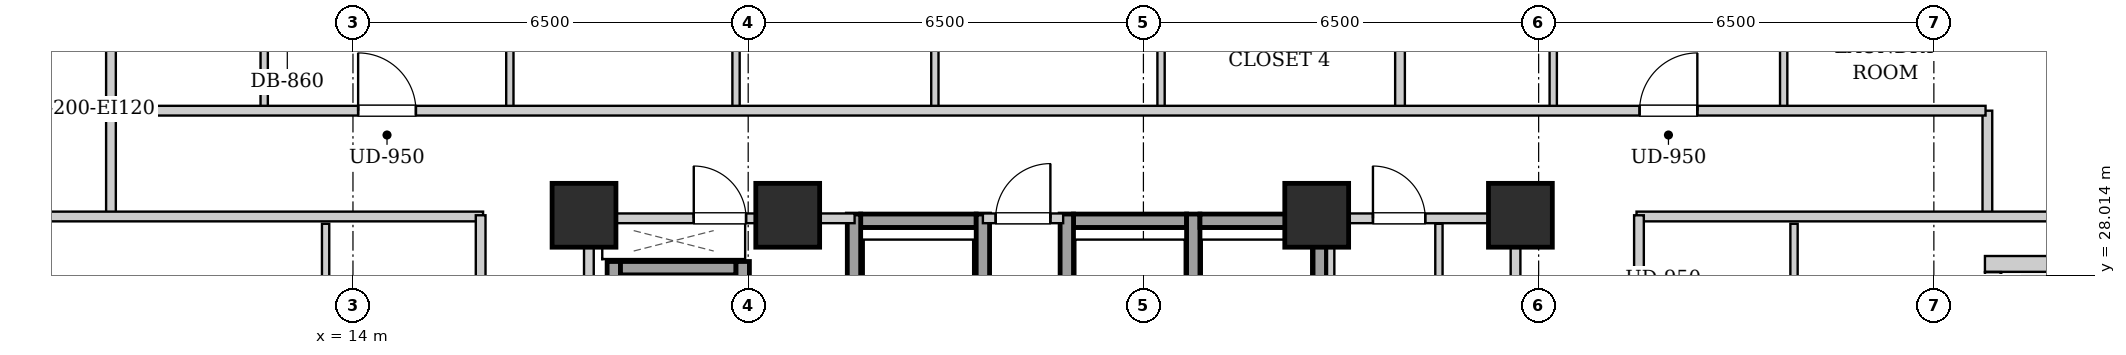
"""IFC4 building model, lengths in metres.
Left out: names, types, materials, properties, quantities, classifications, styles, units other than length and angle.
Written with IfcOpenShell. Run it as: python <this file> out.ifc"""

import sys

from ifc_helpers import new_model, si_unit, direction, frame, frame_2d, origin, origin_2d, place, context, subcontext, project, spatial, rectangle, extrude, element, fill, save


model = new_model("IFC4")
c1 = context("Model", 3, precision=1e-05, world=origin(), true_north=direction((0.0, 1.0)))
c2 = subcontext(c1, "Body", "Model", "MODEL_VIEW")
j1 = project(units=[si_unit("LENGTHUNIT", "METRE"), si_unit("PLANEANGLEUNIT", "RADIAN")], contexts=[c1])
p1 = place(None, origin())
s1 = spatial("IfcSite", under=j1, at=p1, CompositionType="ELEMENT")
p2 = place(p1, origin())
s2 = spatial("IfcBuilding", under=s1, at=p2, CompositionType="ELEMENT")
p3 = place(p2, frame((0.0, 0.0, 110.3)))
s3 = spatial("IfcBuildingStorey", under=s2, at=p3, CompositionType="ELEMENT", Elevation=110.3)
for number, where, z_axis, x_axis in (
    (1, (17.8, 29.0, 0.0), (0.0, 0.0, 1.0), (1.0, 0.0, 0.0)),
    (2, (21.15, 29.0, 0.0), (0.0, 0.0, 1.0), (1.0, 0.0, 0.0)),
    (3, (29.85, 29.0, 0.0), (0.0, 0.0, 1.0), (1.0, 0.0, 0.0)),
    (4, (33.2, 29.0, 0.0), (0.0, 0.0, 1.0), (1.0, 0.0, 0.0)),
):
    element("IfcColumn", number, at=place(p3, frame(where, z_axis=z_axis, x_axis=x_axis)), inside=s3, PredefinedType="COLUMN", context=c2, shape_type="SweptSolid", body=[
        extrude(rectangle(XDim=1.05, YDim=1.05, at=origin_2d()), origin(), (0.0, 0.0, 1.0), 3.2),
    ])
p4 = place(p3, frame((43.24, 28.2, 0.0), z_axis=(0.0, 0.0, 1.0), x_axis=(-1.0, 0.0, 0.0)))
e5 = element("IfcWall", 5, at=p4, inside=s3, PredefinedType="SOLIDWALL", context=c2, shape_type="SweptSolid", body=[
    extrude(rectangle(XDim=2.4, YDim=0.26, at=frame_2d((1.2, 0.0))), origin(), (0.0, 0.0, 1.0), 2.94),
])
p5 = place(p3, frame((40.97, 28.066, 0.0), z_axis=(0.0, 0.0, 1.0), x_axis=(0.0, -1.0, 0.0)))
e6 = element("IfcWall", 6, at=p5, inside=s3, PredefinedType="SOLIDWALL", context=c2, shape_type="SweptSolid", body=[
    extrude(rectangle(XDim=3.332, YDim=0.26, at=frame_2d((1.666, 0.0))), origin(), (0.0, 0.0, 1.0), 2.94),
])
p6 = place(p5, frame((1.116, 0.0, 0.0)))
e7 = element("IfcOpeningElement", 7, at=p6, cuts=e6, PredefinedType="OPENING", context=c2, shape_type="SweptSolid", body=[
    extrude(rectangle(XDim=1.1, YDim=2.0, at=frame_2d((0.55, 1.0))), frame((0.0, 0.14, 0.0), z_axis=(0.0, -1.0, 0.0), x_axis=(1.0, 0.0, 0.0)), (0.0, 0.0, 1.0), 0.28),
])
p7 = place(p5, frame((0.276, 0.0, 0.55)))
e8 = element("IfcOpeningElement", 8, at=p7, cuts=e6, PredefinedType="OPENING", context=c2, shape_type="SweptSolid", body=[
    extrude(rectangle(XDim=0.68, YDim=1.2, at=frame_2d((0.34, 0.6))), frame((0.0, 0.14, 0.0), z_axis=(0.0, -1.0, 0.0), x_axis=(1.0, 0.0, 0.0)), (0.0, 0.0, 1.0), 0.28),
])
p8 = place(p3, frame((22.35, 28.91, 0.0), z_axis=(0.0, 0.0, 1.0), x_axis=(1.0, 0.0, 0.0)))
e9 = element("IfcWall", 9, at=p8, inside=s3, PredefinedType="SHEAR", context=c2, shape_type="SweptSolid", body=[
    extrude(rectangle(XDim=1.9, YDim=0.22, at=frame_2d((0.95, 0.0))), origin(), (0.0, 0.0, 1.0), 2.94),
])
for number, where, z_axis, x_axis in (
    (10, (22.24, 26.58, 0.0), (0.0, 0.0, 1.0), (0.0, 1.0, 0.0)),
    (11, (24.36, 26.58, 0.0), (0.0, 0.0, 1.0), (0.0, 1.0, 0.0)),
):
    element("IfcWall", number, at=place(p3, frame(where, z_axis=z_axis, x_axis=x_axis)), inside=s3, PredefinedType="SHEAR", context=c2, shape_type="SweptSolid", body=[
        extrude(rectangle(XDim=2.44, YDim=0.22, at=frame_2d((1.22, 0.0))), origin(), (0.0, 0.0, 1.0), 2.94),
    ])
p9 = place(p3, frame((25.85, 28.91, 0.0), z_axis=(0.0, 0.0, 1.0), x_axis=(1.0, 0.0, 0.0)))
e12 = element("IfcWall", 12, at=p9, inside=s3, PredefinedType="SHEAR", context=c2, shape_type="SweptSolid", body=[
    extrude(rectangle(XDim=1.86, YDim=0.22, at=frame_2d((0.93, 0.0))), origin(), (0.0, 0.0, 1.0), 2.94),
])
for number, where, z_axis, x_axis in (
    (13, (25.74, 26.58, 0.0), (0.0, 0.0, 1.0), (0.0, 1.0, 0.0)),
    (14, (27.82, 26.58, 0.0), (0.0, 0.0, 1.0), (0.0, 1.0, 0.0)),
):
    element("IfcWall", number, at=place(p3, frame(where, z_axis=z_axis, x_axis=x_axis)), inside=s3, PredefinedType="SHEAR", context=c2, shape_type="SweptSolid", body=[
        extrude(rectangle(XDim=2.44, YDim=0.22, at=frame_2d((1.22, 0.0))), origin(), (0.0, 0.0, 1.0), 2.94),
    ])
p10 = place(p3, frame((27.93, 28.91, 0.0), z_axis=(0.0, 0.0, 1.0), x_axis=(1.0, 0.0, 0.0)))
e15 = element("IfcWall", 15, at=p10, inside=s3, PredefinedType="SHEAR", context=c2, shape_type="SweptSolid", body=[
    extrude(rectangle(XDim=1.86, YDim=0.22, at=frame_2d((0.93, 0.0))), origin(), (0.0, 0.0, 1.0), 2.94),
])
p11 = place(p3, frame((29.9, 26.58, 0.0), z_axis=(0.0, 0.0, 1.0), x_axis=(0.0, 1.0, 0.0)))
e16 = element("IfcWall", 16, at=p11, inside=s3, PredefinedType="SHEAR", context=c2, shape_type="SweptSolid", body=[
    extrude(rectangle(XDim=2.44, YDim=0.22, at=frame_2d((1.22, 0.0))), origin(), (0.0, 0.0, 1.0), 2.94),
])
p12 = place(p3, frame((18.29, 24.1, 0.0), z_axis=(0.0, 0.0, 1.0), x_axis=(0.0, 1.0, 0.0)))
e17 = element("IfcWall", 17, at=p12, inside=s3, PredefinedType="SHEAR", context=c2, shape_type="SweptSolid", body=[
    extrude(rectangle(XDim=4.14, YDim=0.22, at=frame_2d((2.07, 0.0))), origin(), (0.0, 0.0, 1.0), 2.94),
])
p13 = place(p3, frame((18.4, 28.13, 0.0), z_axis=(0.0, 0.0, 1.0), x_axis=(1.0, 0.0, 0.0)))
e18 = element("IfcWall", 18, at=p13, inside=s3, PredefinedType="SHEAR", context=c2, shape_type="SweptSolid", body=[
    extrude(rectangle(XDim=1.9, YDim=0.22, at=frame_2d((0.95, 0.0))), origin(), (0.0, 0.0, 1.0), 2.94),
])
p14 = place(p3, frame((20.41, 26.06, 0.0), z_axis=(0.0, 0.0, 1.0), x_axis=(0.0, 1.0, 0.0)))
e19 = element("IfcWall", 19, at=p14, inside=s3, PredefinedType="SHEAR", context=c2, shape_type="SweptSolid", body=[
    extrude(rectangle(XDim=2.18, YDim=0.22, at=frame_2d((1.09, 0.0))), origin(), (0.0, 0.0, 1.0), 2.94),
])
for number, where, z_axis, x_axis in (
    (20, (17.88, 24.12, 0.0), (0.0, 0.0, 1.0), (0.0, 1.0, 0.0)),
    (21, (33.12, 24.12, 0.0), (0.0, 0.0, 1.0), (0.0, 1.0, 0.0)),
):
    element("IfcWall", number, at=place(p3, frame(where, z_axis=z_axis, x_axis=x_axis)), inside=s3, PredefinedType="PARTITIONING", context=c2, shape_type="SweptSolid", body=[
        extrude(rectangle(XDim=4.76, YDim=0.16, at=frame_2d((2.38, 0.0))), origin(), (0.0, 0.0, 1.0), 2.94),
    ])
p15 = place(p3, frame((24.36, 28.95, 0.0), z_axis=(0.0, 0.0, 1.0), x_axis=(1.0, 0.0, 0.0)))
e22 = element("IfcWall", 22, at=p15, inside=s3, PredefinedType="PARTITIONING", context=c2, shape_type="SweptSolid", body=[
    extrude(rectangle(XDim=1.32, YDim=0.16, at=frame_2d((0.66, 0.0))), origin(), (0.0, 0.0, 1.0), 2.313),
])
p16 = place(p15, frame((0.21, 0.0, 0.0)))
e23 = element("IfcOpeningElement", 23, at=p16, cuts=e22, PredefinedType="OPENING", context=c2, shape_type="SweptSolid", body=[
    extrude(rectangle(XDim=0.9, YDim=2.05, at=frame_2d((0.45, 1.025))), frame((0.0, 0.09, 0.0), z_axis=(0.0, -1.0, 0.0), x_axis=(1.0, 0.0, 0.0)), (0.0, 0.0, 1.0), 0.18),
])
p17 = place(p3, frame((17.96, 28.95, 0.0), z_axis=(0.0, 0.0, 1.0), x_axis=(1.0, 0.0, 0.0)))
e24 = element("IfcWall", 24, at=p17, inside=s3, PredefinedType="PARTITIONING", context=c2, shape_type="SweptSolid", body=[
    extrude(rectangle(XDim=4.29, YDim=0.16, at=frame_2d((2.145, 0.0))), origin(), (0.0, 0.0, 1.0), 2.313),
])
p18 = place(p17, frame((1.645, 0.0, 0.0)))
e25 = element("IfcOpeningElement", 25, at=p18, cuts=e24, PredefinedType="OPENING", context=c2, shape_type="SweptSolid", body=[
    extrude(rectangle(XDim=0.86, YDim=2.05, at=frame_2d((0.43, 1.025))), frame((0.0, 0.09, 0.0), z_axis=(0.0, -1.0, 0.0), x_axis=(1.0, 0.0, 0.0)), (0.0, 0.0, 1.0), 0.18),
])
p19 = place(p3, frame((30.08, 26.18, 0.0), z_axis=(0.0, 0.0, 1.0), x_axis=(0.0, 1.0, 0.0)))
e26 = element("IfcWall", 26, at=p19, inside=s3, PredefinedType="PARTITIONING", context=c2, shape_type="SweptSolid", body=[
    extrude(rectangle(XDim=2.68, YDim=0.12, at=frame_2d((1.34, 0.0))), origin(), (0.0, 0.0, 1.0), 2.94),
])
p20 = place(p3, frame((31.86, 26.2, 0.0), z_axis=(0.0, 0.0, 1.0), x_axis=(0.0, 1.0, 0.0)))
e27 = element("IfcWall", 27, at=p20, inside=s3, PredefinedType="PARTITIONING", context=c2, shape_type="SweptSolid", body=[
    extrude(rectangle(XDim=2.66, YDim=0.12, at=frame_2d((1.33, 0.0))), origin(), (0.0, 0.0, 1.0), 2.94),
])
p21 = place(p20, frame((0.92, 0.0, 0.0)))
e28 = element("IfcOpeningElement", 28, at=p21, cuts=e27, PredefinedType="OPENING", context=c2, shape_type="SweptSolid", body=[
    extrude(rectangle(XDim=0.86, YDim=2.05, at=frame_2d((0.43, 1.025))), frame((0.0, 0.07, 0.0), z_axis=(0.0, -1.0, 0.0), x_axis=(1.0, 0.0, 0.0)), (0.0, 0.0, 1.0), 0.14),
])
p22 = place(p3, frame((30.08, 28.95, 0.0), z_axis=(0.0, 0.0, 1.0), x_axis=(1.0, 0.0, 0.0)))
e29 = element("IfcWall", 29, at=p22, inside=s3, PredefinedType="PARTITIONING", context=c2, shape_type="SweptSolid", body=[
    extrude(rectangle(XDim=2.96, YDim=0.16, at=frame_2d((1.48, 0.0))), origin(), (0.0, 0.0, 1.0), 2.94),
])
p23 = place(p22, frame((0.695, 0.0, 0.0)))
e30 = element("IfcOpeningElement", 30, at=p23, cuts=e29, PredefinedType="OPENING", context=c2, shape_type="SweptSolid", body=[
    extrude(rectangle(XDim=0.86, YDim=2.05, at=frame_2d((0.43, 1.025))), frame((0.0, 0.09, 0.0), z_axis=(0.0, -1.0, 0.0), x_axis=(1.0, 0.0, 0.0)), (0.0, 0.0, 1.0), 0.18),
])
for number, where, z_axis, x_axis in (
    (31, (10.02, 28.98, 0.0), (0.0, 0.0, 1.0), (0.0, 1.0, 0.0)),
    (32, (40.88, 28.98, 0.0), (0.0, 0.0, 1.0), (0.0, 1.0, 0.0)),
):
    element("IfcWall", number, at=place(p3, frame(where, z_axis=z_axis, x_axis=x_axis)), inside=s3, PredefinedType="PARTITIONING", context=c2, shape_type="SweptSolid", body=[
        extrude(rectangle(XDim=1.74, YDim=0.16, at=frame_2d((0.87, 0.0))), origin(), (0.0, 0.0, 1.0), 2.94),
    ])
p24 = place(p3, frame((7.78, 28.98, 0.0), z_axis=(0.0, 0.0, 1.0), x_axis=(1.0, 0.0, 0.0)))
e33 = element("IfcWall", 33, at=p24, inside=s3, PredefinedType="PARTITIONING", context=c2, shape_type="SweptSolid", body=[
    extrude(rectangle(XDim=8.36, YDim=0.16, at=frame_2d((4.18, 0.0))), origin(), (0.0, 0.0, 1.0), 2.313),
])
p25 = place(p3, frame((35.11, 28.98, 0.0), z_axis=(0.0, 0.0, 1.0), x_axis=(1.0, 0.0, 0.0)))
e34 = element("IfcWall", 34, at=p25, inside=s3, PredefinedType="PARTITIONING", context=c2, shape_type="SweptSolid", body=[
    extrude(rectangle(XDim=8.01, YDim=0.16, at=frame_2d((4.005, 0.0))), origin(), (0.0, 0.0, 1.0), 2.313),
])
p26 = place(p3, frame((10.02, 30.76, 0.0), z_axis=(0.0, 0.0, 1.0), x_axis=(0.0, 1.0, 0.0)))
e35 = element("IfcWall", 35, at=p26, inside=s3, PredefinedType="PARTITIONING", context=c2, shape_type="SweptSolid", body=[
    extrude(rectangle(XDim=2.91, YDim=0.16, at=frame_2d((1.455, 0.0))), origin(), (0.0, 0.0, 1.0), 2.94),
])
p27 = place(p3, frame((12.54, 30.76, 0.0), z_axis=(0.0, 0.0, 1.0), x_axis=(0.0, 1.0, 0.0)))
e36 = element("IfcWall", 36, at=p27, inside=s3, PredefinedType="PARTITIONING", context=c2, shape_type="SweptSolid", body=[
    extrude(rectangle(XDim=2.85, YDim=0.12, at=frame_2d((1.425, 0.0))), origin(), (0.0, 0.0, 1.0), 2.94),
])
p28 = place(p27, frame((0.995, 0.0, 0.0)))
e37 = element("IfcOpeningElement", 37, at=p28, cuts=e36, PredefinedType="OPENING", context=c2, shape_type="SweptSolid", body=[
    extrude(rectangle(XDim=0.86, YDim=2.05, at=frame_2d((0.43, 1.025))), frame((0.0, 0.07, 0.0), z_axis=(0.0, -1.0, 0.0), x_axis=(1.0, 0.0, 0.0)), (0.0, 0.0, 1.0), 0.14),
])
p29 = place(p3, frame((16.58, 30.76, 0.0), z_axis=(0.0, 0.0, 1.0), x_axis=(0.0, 1.0, 0.0)))
e38 = element("IfcWall", 38, at=p29, inside=s3, PredefinedType="PARTITIONING", context=c2, shape_type="SweptSolid", body=[
    extrude(rectangle(XDim=2.85, YDim=0.12, at=frame_2d((1.425, 0.0))), origin(), (0.0, 0.0, 1.0), 2.94),
])
p30 = place(p29, frame((0.975, 0.0, 0.0)))
e39 = element("IfcOpeningElement", 39, at=p30, cuts=e38, PredefinedType="OPENING", context=c2, shape_type="SweptSolid", body=[
    extrude(rectangle(XDim=0.9, YDim=2.05, at=frame_2d((0.45, 1.025))), frame((0.0, 0.07, 0.0), z_axis=(0.0, -1.0, 0.0), x_axis=(1.0, 0.0, 0.0)), (0.0, 0.0, 1.0), 0.14),
])
p31 = place(p3, frame((20.3, 30.76, 0.0), z_axis=(0.0, 0.0, 1.0), x_axis=(0.0, 1.0, 0.0)))
e40 = element("IfcWall", 40, at=p31, inside=s3, PredefinedType="PARTITIONING", context=c2, shape_type="SweptSolid", body=[
    extrude(rectangle(XDim=2.85, YDim=0.12, at=frame_2d((1.425, 0.0))), origin(), (0.0, 0.0, 1.0), 2.94),
])
p32 = place(p31, frame((0.975, 0.0, 0.0)))
e41 = element("IfcOpeningElement", 41, at=p32, cuts=e40, PredefinedType="OPENING", context=c2, shape_type="SweptSolid", body=[
    extrude(rectangle(XDim=0.9, YDim=2.05, at=frame_2d((0.45, 1.025))), frame((0.0, 0.07, 0.0), z_axis=(0.0, -1.0, 0.0), x_axis=(1.0, 0.0, 0.0)), (0.0, 0.0, 1.0), 0.14),
])
p33 = place(p3, frame((23.57, 30.76, 0.0), z_axis=(0.0, 0.0, 1.0), x_axis=(0.0, 1.0, 0.0)))
e42 = element("IfcWall", 42, at=p33, inside=s3, PredefinedType="PARTITIONING", context=c2, shape_type="SweptSolid", body=[
    extrude(rectangle(XDim=2.85, YDim=0.12, at=frame_2d((1.425, 0.0))), origin(), (0.0, 0.0, 1.0), 2.94),
])
p34 = place(p33, frame((0.975, 0.0, 0.0)))
e43 = element("IfcOpeningElement", 43, at=p34, cuts=e42, PredefinedType="OPENING", context=c2, shape_type="SweptSolid", body=[
    extrude(rectangle(XDim=0.9, YDim=2.05, at=frame_2d((0.45, 1.025))), frame((0.0, 0.07, 0.0), z_axis=(0.0, -1.0, 0.0), x_axis=(1.0, 0.0, 0.0)), (0.0, 0.0, 1.0), 0.14),
])
p35 = place(p3, frame((27.29, 30.76, 0.0), z_axis=(0.0, 0.0, 1.0), x_axis=(0.0, 1.0, 0.0)))
e44 = element("IfcWall", 44, at=p35, inside=s3, PredefinedType="PARTITIONING", context=c2, shape_type="SweptSolid", body=[
    extrude(rectangle(XDim=2.85, YDim=0.12, at=frame_2d((1.425, 0.0))), origin(), (0.0, 0.0, 1.0), 2.94),
])
p36 = place(p35, frame((0.975, 0.0, 0.0)))
e45 = element("IfcOpeningElement", 45, at=p36, cuts=e44, PredefinedType="OPENING", context=c2, shape_type="SweptSolid", body=[
    extrude(rectangle(XDim=0.9, YDim=2.05, at=frame_2d((0.45, 1.025))), frame((0.0, 0.07, 0.0), z_axis=(0.0, -1.0, 0.0), x_axis=(1.0, 0.0, 0.0)), (0.0, 0.0, 1.0), 0.14),
])
p37 = place(p3, frame((31.22, 30.76, 0.0), z_axis=(0.0, 0.0, 1.0), x_axis=(0.0, 1.0, 0.0)))
e46 = element("IfcWall", 46, at=p37, inside=s3, PredefinedType="PARTITIONING", context=c2, shape_type="SweptSolid", body=[
    extrude(rectangle(XDim=12.26, YDim=0.16, at=frame_2d((6.13, 0.0))), origin(), (0.0, 0.0, 1.0), 2.94),
])
p38 = place(p3, frame((33.74, 30.76, 0.0), z_axis=(0.0, 0.0, 1.0), x_axis=(0.0, 1.0, 0.0)))
e47 = element("IfcWall", 47, at=p38, inside=s3, PredefinedType="PARTITIONING", context=c2, shape_type="SweptSolid", body=[
    extrude(rectangle(XDim=2.85, YDim=0.12, at=frame_2d((1.425, 0.0))), origin(), (0.0, 0.0, 1.0), 2.94),
])
p39 = place(p38, frame((0.995, 0.0, 0.0)))
e48 = element("IfcOpeningElement", 48, at=p39, cuts=e47, PredefinedType="OPENING", context=c2, shape_type="SweptSolid", body=[
    extrude(rectangle(XDim=0.86, YDim=2.05, at=frame_2d((0.43, 1.025))), frame((0.0, 0.07, 0.0), z_axis=(0.0, -1.0, 0.0), x_axis=(1.0, 0.0, 0.0)), (0.0, 0.0, 1.0), 0.14),
])
p40 = place(p3, frame((37.53, 30.76, 0.0), z_axis=(0.0, 0.0, 1.0), x_axis=(0.0, 1.0, 0.0)))
e49 = element("IfcWall", 49, at=p40, inside=s3, PredefinedType="PARTITIONING", context=c2, shape_type="SweptSolid", body=[
    extrude(rectangle(XDim=2.85, YDim=0.12, at=frame_2d((1.425, 0.0))), origin(), (0.0, 0.0, 1.0), 2.94),
])
p41 = place(p40, frame((0.975, 0.0, 0.0)))
e50 = element("IfcOpeningElement", 50, at=p41, cuts=e49, PredefinedType="OPENING", context=c2, shape_type="SweptSolid", body=[
    extrude(rectangle(XDim=0.9, YDim=2.05, at=frame_2d((0.45, 1.025))), frame((0.0, 0.07, 0.0), z_axis=(0.0, -1.0, 0.0), x_axis=(1.0, 0.0, 0.0)), (0.0, 0.0, 1.0), 0.14),
])
p42 = place(p3, frame((13.55, 25.052, 0.0), z_axis=(0.0, 0.0, 1.0), x_axis=(0.0, 1.0, 0.0)))
e51 = element("IfcWall", 51, at=p42, inside=s3, PredefinedType="PARTITIONING", context=c2, shape_type="SweptSolid", body=[
    extrude(rectangle(XDim=3.808, YDim=0.12, at=frame_2d((1.904, 0.0))), origin(), (0.0, 0.0, 1.0), 2.94),
])
p43 = place(p42, frame((1.454, 0.0, 0.0)))
e52 = element("IfcOpeningElement", 52, at=p43, cuts=e51, PredefinedType="OPENING", context=c2, shape_type="SweptSolid", body=[
    extrude(rectangle(XDim=0.9, YDim=2.05, at=frame_2d((0.45, 1.025))), frame((0.0, 0.07, 0.0), z_axis=(0.0, -1.0, 0.0), x_axis=(1.0, 0.0, 0.0)), (0.0, 0.0, 1.0), 0.14),
])
p44 = place(p3, frame((37.7, 25.052, 0.0), z_axis=(0.0, 0.0, 1.0), x_axis=(0.0, 1.0, 0.0)))
e53 = element("IfcWall", 53, at=p44, inside=s3, PredefinedType="PARTITIONING", context=c2, shape_type="SweptSolid", body=[
    extrude(rectangle(XDim=3.808, YDim=0.12, at=frame_2d((1.904, 0.0))), origin(), (0.0, 0.0, 1.0), 2.94),
])
p45 = place(p44, frame((1.454, 0.0, 0.0)))
e54 = element("IfcOpeningElement", 54, at=p45, cuts=e53, PredefinedType="OPENING", context=c2, shape_type="SweptSolid", body=[
    extrude(rectangle(XDim=0.9, YDim=2.05, at=frame_2d((0.45, 1.025))), frame((0.0, 0.07, 0.0), z_axis=(0.0, -1.0, 0.0), x_axis=(1.0, 0.0, 0.0)), (0.0, 0.0, 1.0), 0.14),
])
p46 = place(p3, frame((10.05, 30.72, 0.0), z_axis=(0.0, 0.0, 1.0), x_axis=(1.0, 0.0, 0.0)))
e55 = element("IfcWall", 55, at=p46, inside=s3, PredefinedType="PARTITIONING", context=c2, shape_type="SweptSolid", body=[
    extrude(rectangle(XDim=30.8, YDim=0.16, at=frame_2d((15.4, 0.0))), origin(), (0.0, 0.0, 1.0), 2.94),
])
p47 = place(p46, frame((4.035, 0.0, 0.0)))
e56 = element("IfcOpeningElement", 56, at=p47, cuts=e55, PredefinedType="OPENING", context=c2, shape_type="SweptSolid", body=[
    extrude(rectangle(XDim=0.95, YDim=2.1, at=frame_2d((0.475, 1.05))), frame((0.0, 0.09, 0.0), z_axis=(0.0, -1.0, 0.0), x_axis=(1.0, 0.0, 0.0)), (0.0, 0.0, 1.0), 0.18),
])
p48 = place(p46, frame((25.11, 0.0, 0.0)))
e57 = element("IfcOpeningElement", 57, at=p48, cuts=e55, PredefinedType="OPENING", context=c2, shape_type="SweptSolid", body=[
    extrude(rectangle(XDim=0.95, YDim=2.1, at=frame_2d((0.475, 1.05))), frame((0.0, 0.09, 0.0), z_axis=(0.0, -1.0, 0.0), x_axis=(1.0, 0.0, 0.0)), (0.0, 0.0, 1.0), 0.18),
])
p49 = place(p3, frame((16.1, 15.07, 0.0), z_axis=(0.0, 0.0, 1.0), x_axis=(0.0, 1.0, 0.0)))
e58 = element("IfcWall", 58, at=p49, inside=s3, PredefinedType="PARTITIONING", context=c2, shape_type="SweptSolid", body=[
    extrude(rectangle(XDim=13.93, YDim=0.16, at=frame_2d((6.965, 0.0))), origin(), (0.0, 0.0, 1.0), 2.94),
])
p50 = place(p49, frame((4.661, 0.0, 0.0)))
e59 = element("IfcOpeningElement", 59, at=p50, cuts=e58, PredefinedType="OPENING", context=c2, shape_type="SweptSolid", body=[
    extrude(rectangle(XDim=0.95, YDim=2.1, at=frame_2d((0.475, 1.05))), frame((0.0, 0.09, 0.0), z_axis=(0.0, -1.0, 0.0), x_axis=(1.0, 0.0, 0.0)), (0.0, 0.0, 1.0), 0.18),
])
p51 = place(p49, frame((11.411, 0.0, 0.0)))
e60 = element("IfcOpeningElement", 60, at=p51, cuts=e58, PredefinedType="OPENING", context=c2, shape_type="SweptSolid", body=[
    extrude(rectangle(XDim=0.95, YDim=2.1, at=frame_2d((0.475, 1.05))), frame((0.0, 0.09, 0.0), z_axis=(0.0, -1.0, 0.0), x_axis=(1.0, 0.0, 0.0)), (0.0, 0.0, 1.0), 0.18),
])
p52 = place(p3, frame((35.15, 15.07, 0.0), z_axis=(0.0, 0.0, 1.0), x_axis=(0.0, 1.0, 0.0)))
e61 = element("IfcWall", 61, at=p52, inside=s3, PredefinedType="PARTITIONING", context=c2, shape_type="SweptSolid", body=[
    extrude(rectangle(XDim=13.93, YDim=0.16, at=frame_2d((6.965, 0.0))), origin(), (0.0, 0.0, 1.0), 2.94),
])
p53 = place(p52, frame((4.661, 0.0, 0.0)))
e62 = element("IfcOpeningElement", 62, at=p53, cuts=e61, PredefinedType="OPENING", context=c2, shape_type="SweptSolid", body=[
    extrude(rectangle(XDim=0.95, YDim=2.1, at=frame_2d((0.475, 1.05))), frame((0.0, 0.09, 0.0), z_axis=(0.0, -1.0, 0.0), x_axis=(1.0, 0.0, 0.0)), (0.0, 0.0, 1.0), 0.18),
])
p54 = place(p52, frame((11.411, 0.0, 0.0)))
e63 = element("IfcOpeningElement", 63, at=p54, cuts=e61, PredefinedType="OPENING", context=c2, shape_type="SweptSolid", body=[
    extrude(rectangle(XDim=0.95, YDim=2.1, at=frame_2d((0.475, 1.05))), frame((0.0, 0.09, 0.0), z_axis=(0.0, -1.0, 0.0), x_axis=(1.0, 0.0, 0.0)), (0.0, 0.0, 1.0), 0.18),
])
p55 = place(p16, origin())
e64 = element("IfcDoor", 64, at=p55, inside=s3, OperationType="SINGLE_SWING_RIGHT", PredefinedType="DOOR", context=c2, shape_type="SweptSolid", body=[
    extrude(rectangle(XDim=0.9, YDim=2.05, at=frame_2d((0.45, 1.025))), frame((0.0, 0.025, 0.0), z_axis=(0.0, -1.0, 0.0), x_axis=(1.0, 0.0, 0.0)), (0.0, 0.0, 1.0), 0.05),
])
fill(e23, e64)
p56 = place(p18, origin())
e65 = element("IfcDoor", 65, at=p56, inside=s3, OperationType="SINGLE_SWING_LEFT", PredefinedType="DOOR", context=c2, shape_type="SweptSolid", body=[
    extrude(rectangle(XDim=0.86, YDim=2.05, at=frame_2d((0.43, 1.025))), frame((0.0, 0.025, 0.0), z_axis=(0.0, -1.0, 0.0), x_axis=(1.0, 0.0, 0.0)), (0.0, 0.0, 1.0), 0.05),
])
fill(e25, e65)
p57 = place(p23, origin())
e66 = element("IfcDoor", 66, at=p57, inside=s3, OperationType="SINGLE_SWING_LEFT", PredefinedType="DOOR", context=c2, shape_type="SweptSolid", body=[
    extrude(rectangle(XDim=0.86, YDim=2.05, at=frame_2d((0.43, 1.025))), frame((0.0, 0.025, 0.0), z_axis=(0.0, -1.0, 0.0), x_axis=(1.0, 0.0, 0.0)), (0.0, 0.0, 1.0), 0.05),
])
fill(e30, e66)
p58 = place(p47, origin())
e67 = element("IfcDoor", 67, at=p58, inside=s3, OperationType="SINGLE_SWING_LEFT", PredefinedType="DOOR", context=c2, shape_type="SweptSolid", body=[
    extrude(rectangle(XDim=0.95, YDim=2.1, at=frame_2d((0.475, 1.05))), frame((0.0, 0.025, 0.0), z_axis=(0.0, -1.0, 0.0), x_axis=(1.0, 0.0, 0.0)), (0.0, 0.0, 1.0), 0.05),
])
fill(e56, e67)
p59 = place(p48, origin())
e68 = element("IfcDoor", 68, at=p59, inside=s3, OperationType="SINGLE_SWING_RIGHT", PredefinedType="DOOR", context=c2, shape_type="SweptSolid", body=[
    extrude(rectangle(XDim=0.95, YDim=2.1, at=frame_2d((0.475, 1.05))), frame((0.0, 0.025, 0.0), z_axis=(0.0, -1.0, 0.0), x_axis=(1.0, 0.0, 0.0)), (0.0, 0.0, 1.0), 0.05),
])
fill(e57, e68)
save(model, sys.argv[1])
